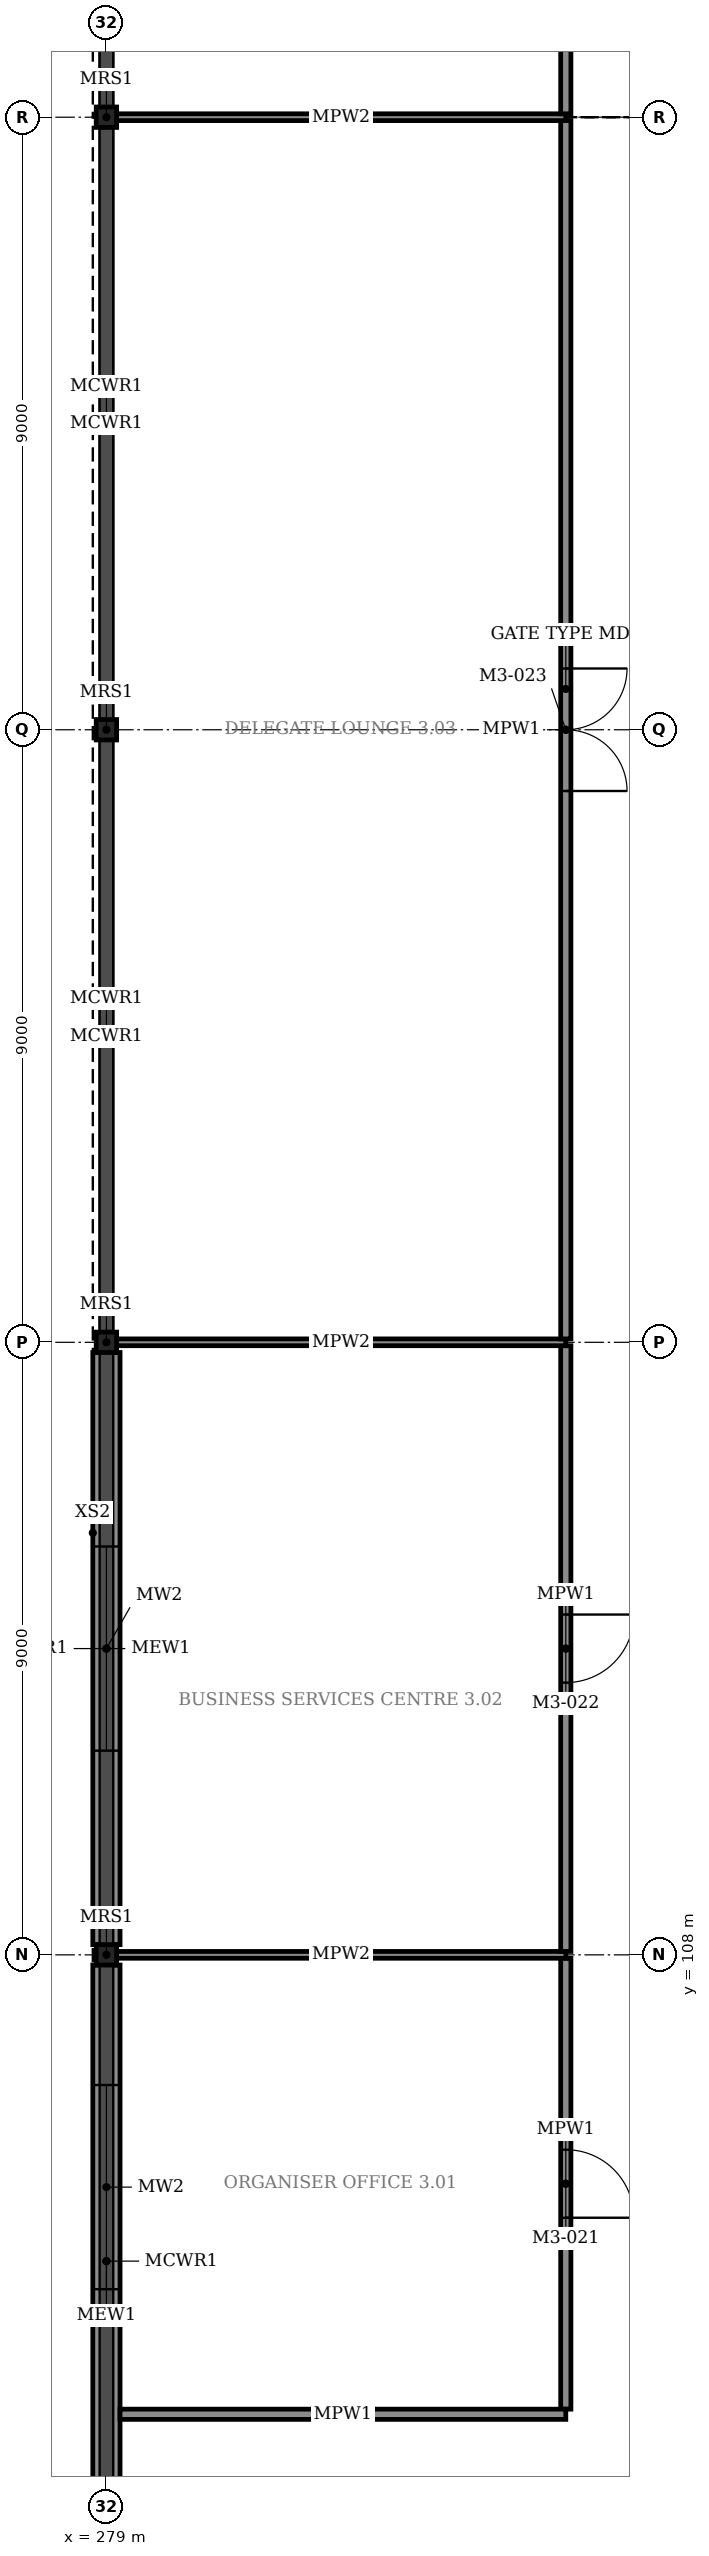
"""IFC4 building model, lengths in metres.
Left out: names, types, materials, properties, quantities, classifications, styles, units other than length and angle.
Written with IfcOpenShell. Run it as: python <this file> out.ifc"""

import sys

from ifc_helpers import new_model, si_unit, direction, frame, frame_2d, origin, origin_2d, place, context, subcontext, project, spatial, rectangle, hollow_rectangle, extrude, element, fill, save


model = new_model("IFC4")
c1 = context("Model", 3, precision=1e-05, world=origin(), true_north=direction((0.0, 1.0)))
c2 = subcontext(c1, "Body", "Model", "MODEL_VIEW")
j1 = project(units=[si_unit("LENGTHUNIT", "METRE"), si_unit("PLANEANGLEUNIT", "RADIAN")], contexts=[c1])
p1 = place(None, origin())
s1 = spatial("IfcSite", under=j1, at=p1, CompositionType="ELEMENT")
p2 = place(p1, origin())
s2 = spatial("IfcBuilding", under=s1, at=p2, CompositionType="ELEMENT")
p3 = place(p2, frame((0.0, 0.0, 17.0)))
s3 = spatial("IfcBuildingStorey", under=s2, at=p3, CompositionType="ELEMENT", Elevation=17.0)
for number, where, z_axis, x_axis in (
    (1, (279.0, 108.0, 0.0), (0.0, 0.0, 1.0), (1.0, 0.0, 0.0)),
    (2, (279.0, 117.0, 0.0), (0.0, 0.0, 1.0), (1.0, 0.0, 0.0)),
    (3, (279.0, 126.0, 0.0), (0.0, 0.0, 1.0), (1.0, 0.0, 0.0)),
    (4, (279.0, 135.0, 0.0), (0.0, 0.0, 1.0), (1.0, 0.0, 0.0)),
):
    element("IfcColumn", number, at=place(p3, frame(where, z_axis=z_axis, x_axis=x_axis)), inside=s3, PredefinedType="COLUMN", context=c2, shape_type="SweptSolid", body=[
        extrude(hollow_rectangle(XDim=0.3, YDim=0.3, WallThickness=0.012, InnerFilletRadius=0.024, OuterFilletRadius=0.036, at=origin_2d()), origin(), (0.0, 0.0, 1.0), 3.1),
    ])
p4 = place(p3, frame((279.0, 99.15, 0.0), z_axis=(0.0, 0.0, 1.0), x_axis=(0.0, 1.0, 0.0)))
e5 = element("IfcWall", 5, at=p4, inside=s3, PredefinedType="STANDARD", context=c2, shape_type="SweptSolid", body=[
    extrude(rectangle(XDim=8.7, YDim=0.4, at=frame_2d((4.35, 0.0))), origin(), (0.0, 0.0, 1.0), 3.3),
])
p5 = place(p4, frame((3.938, 0.0, 0.9)))
e6 = element("IfcOpeningElement", 6, at=p5, cuts=e5, PredefinedType="OPENING", context=c2, shape_type="SweptSolid", body=[
    extrude(rectangle(XDim=3.0, YDim=2.1, at=frame_2d((1.5, 1.05))), frame((0.0, 0.21, 0.0), z_axis=(0.0, -1.0, 0.0), x_axis=(1.0, 0.0, 0.0)), (0.0, 0.0, 1.0), 0.42),
])
p6 = place(p3, frame((279.0, 108.15, 0.0), z_axis=(0.0, 0.0, 1.0), x_axis=(0.0, 1.0, 0.0)))
e7 = element("IfcWall", 7, at=p6, inside=s3, PredefinedType="STANDARD", context=c2, shape_type="SweptSolid", body=[
    extrude(rectangle(XDim=8.7, YDim=0.4, at=frame_2d((4.35, 0.0))), origin(), (0.0, 0.0, 1.0), 3.3),
])
p7 = place(p6, frame((2.85, 0.0, 0.9)))
e8 = element("IfcOpeningElement", 8, at=p7, cuts=e7, PredefinedType="OPENING", context=c2, shape_type="SweptSolid", body=[
    extrude(rectangle(XDim=3.0, YDim=2.1, at=frame_2d((1.5, 1.05))), frame((0.0, 0.21, 0.0), z_axis=(0.0, -1.0, 0.0), x_axis=(1.0, 0.0, 0.0)), (0.0, 0.0, 1.0), 0.42),
])
p8 = place(p3, frame((279.2, 101.25, 0.0), z_axis=(0.0, 0.0, 1.0), x_axis=(1.0, 0.0, 0.0)))
e9 = element("IfcWall", 9, at=p8, inside=s3, PredefinedType="PARTITIONING", context=c2, shape_type="SweptSolid", body=[
    extrude(rectangle(XDim=6.55, YDim=0.15, at=frame_2d((3.275, 0.0))), origin(), (0.0, 0.0, 1.0), 3.0),
])
p9 = place(p3, frame((279.15, 108.0, 0.0), z_axis=(0.0, 0.0, 1.0), x_axis=(1.0, 0.0, 0.0)))
e10 = element("IfcWall", 10, at=p9, inside=s3, PredefinedType="PARTITIONING", context=c2, shape_type="SweptSolid", body=[
    extrude(rectangle(XDim=6.6, YDim=0.1, at=frame_2d((3.3, 0.0))), origin(), (0.0, 0.0, 1.0), 3.0),
])
p10 = place(p3, frame((285.75, 101.325, 0.0), z_axis=(0.0, 0.0, 1.0), x_axis=(0.0, 1.0, 0.0)))
e11 = element("IfcWall", 11, at=p10, inside=s3, PredefinedType="PARTITIONING", context=c2, shape_type="SweptSolid", body=[
    extrude(rectangle(XDim=6.625, YDim=0.15, at=frame_2d((3.312, 0.0))), origin(), (0.0, 0.0, 1.0), 3.0),
])
p11 = place(p10, frame((2.812, 0.0, 0.0)))
e12 = element("IfcOpeningElement", 12, at=p11, cuts=e11, PredefinedType="OPENING", context=c2, shape_type="SweptSolid", body=[
    extrude(rectangle(XDim=1.0, YDim=2.4, at=frame_2d((0.5, 1.2))), frame((0.0, 0.085, 0.0), z_axis=(0.0, -1.0, 0.0), x_axis=(1.0, 0.0, 0.0)), (0.0, 0.0, 1.0), 0.17),
])
p12 = place(p3, frame((279.15, 117.0, 0.0), z_axis=(0.0, 0.0, 1.0), x_axis=(1.0, 0.0, 0.0)))
e13 = element("IfcWall", 13, at=p12, inside=s3, PredefinedType="PARTITIONING", context=c2, shape_type="SweptSolid", body=[
    extrude(rectangle(XDim=6.6, YDim=0.1, at=frame_2d((3.3, 0.0))), origin(), (0.0, 0.0, 1.0), 3.0),
])
p13 = place(p3, frame((285.75, 108.05, 0.0), z_axis=(0.0, 0.0, 1.0), x_axis=(0.0, 1.0, 0.0)))
e14 = element("IfcWall", 14, at=p13, inside=s3, PredefinedType="PARTITIONING", context=c2, shape_type="SweptSolid", body=[
    extrude(rectangle(XDim=8.9, YDim=0.15, at=frame_2d((4.45, 0.0))), origin(), (0.0, 0.0, 1.0), 3.0),
])
p14 = place(p13, frame((3.95, 0.0, 0.0)))
e15 = element("IfcOpeningElement", 15, at=p14, cuts=e14, PredefinedType="OPENING", context=c2, shape_type="SweptSolid", body=[
    extrude(rectangle(XDim=1.0, YDim=2.4, at=frame_2d((0.5, 1.2))), frame((0.0, 0.085, 0.0), z_axis=(0.0, -1.0, 0.0), x_axis=(1.0, 0.0, 0.0)), (0.0, 0.0, 1.0), 0.17),
])
p15 = place(p3, frame((279.15, 135.0, 0.0), z_axis=(0.0, 0.0, 1.0), x_axis=(1.0, 0.0, 0.0)))
e16 = element("IfcWall", 16, at=p15, inside=s3, PredefinedType="PARTITIONING", context=c2, shape_type="SweptSolid", body=[
    extrude(rectangle(XDim=6.6, YDim=0.1, at=frame_2d((3.3, 0.0))), origin(), (0.0, 0.0, 1.0), 3.0),
])
p16 = place(p3, frame((285.75, 117.05, 0.0), z_axis=(0.0, 0.0, 1.0), x_axis=(0.0, 1.0, 0.0)))
e17 = element("IfcWall", 17, at=p16, inside=s3, PredefinedType="PARTITIONING", context=c2, shape_type="SweptSolid", body=[
    extrude(rectangle(XDim=17.9, YDim=0.15, at=frame_2d((8.95, 0.0))), origin(), (0.0, 0.0, 1.0), 3.0),
])
p17 = place(p16, frame((8.05, 0.0, 0.0)))
e18 = element("IfcOpeningElement", 18, at=p17, cuts=e17, PredefinedType="OPENING", context=c2, shape_type="SweptSolid", body=[
    extrude(rectangle(XDim=1.8, YDim=2.4, at=frame_2d((0.9, 1.2))), frame((0.0, 0.085, 0.0), z_axis=(0.0, -1.0, 0.0), x_axis=(1.0, 0.0, 0.0)), (0.0, 0.0, 1.0), 0.17),
])
p18 = place(p3, frame((285.75, 135.05, 0.0), z_axis=(0.0, 0.0, 1.0), x_axis=(0.0, 1.0, 0.0)))
e19 = element("IfcWall", 19, at=p18, inside=s3, PredefinedType="PARTITIONING", context=c2, shape_type="SweptSolid", body=[
    extrude(rectangle(XDim=8.9, YDim=0.15, at=frame_2d((4.45, 0.0))), origin(), (0.0, 0.0, 1.0), 3.0),
])
p19 = place(p18, frame((3.95, 0.0, 0.0)))
e20 = element("IfcOpeningElement", 20, at=p19, cuts=e19, PredefinedType="OPENING", context=c2, shape_type="SweptSolid", body=[
    extrude(rectangle(XDim=1.0, YDim=2.4, at=frame_2d((0.5, 1.2))), frame((0.0, 0.085, 0.0), z_axis=(0.0, -1.0, 0.0), x_axis=(1.0, 0.0, 0.0)), (0.0, 0.0, 1.0), 0.17),
])
p20 = place(p5, origin())
e21 = element("IfcWindow", 21, at=p20, inside=s3, PartitioningType="TRIPLE_PANEL_VERTICAL", PredefinedType="WINDOW", context=c2, shape_type="SweptSolid", body=[
    extrude(rectangle(XDim=3.0, YDim=2.1, at=frame_2d((1.5, 1.05))), frame((0.0, 0.03, 0.0), z_axis=(0.0, -1.0, 0.0), x_axis=(1.0, 0.0, 0.0)), (0.0, 0.0, 1.0), 0.06),
])
fill(e6, e21)
p21 = place(p7, origin())
e22 = element("IfcWindow", 22, at=p21, inside=s3, PartitioningType="TRIPLE_PANEL_VERTICAL", PredefinedType="WINDOW", context=c2, shape_type="SweptSolid", body=[
    extrude(rectangle(XDim=3.0, YDim=2.1, at=frame_2d((1.5, 1.05))), frame((0.0, 0.03, 0.0), z_axis=(0.0, -1.0, 0.0), x_axis=(1.0, 0.0, 0.0)), (0.0, 0.0, 1.0), 0.06),
])
fill(e8, e22)
p22 = place(p11, frame((1.0, 0.0, 0.0), z_axis=(0.0, 0.0, 1.0), x_axis=(-1.0, 0.0, 0.0)))
e23 = element("IfcDoor", 23, at=p22, inside=s3, OperationType="SINGLE_SWING_LEFT", PredefinedType="DOOR", context=c2, shape_type="SweptSolid", body=[
    extrude(rectangle(XDim=1.0, YDim=2.4, at=frame_2d((0.5, 1.2))), frame((0.0, 0.025, 0.0), z_axis=(0.0, -1.0, 0.0), x_axis=(1.0, 0.0, 0.0)), (0.0, 0.0, 1.0), 0.05),
])
fill(e12, e23)
p23 = place(p14, frame((1.0, 0.0, 0.0), z_axis=(0.0, 0.0, 1.0), x_axis=(-1.0, 0.0, 0.0)))
e24 = element("IfcDoor", 24, at=p23, inside=s3, OperationType="SINGLE_SWING_RIGHT", PredefinedType="DOOR", context=c2, shape_type="SweptSolid", body=[
    extrude(rectangle(XDim=1.0, YDim=2.4, at=frame_2d((0.5, 1.2))), frame((0.0, 0.025, 0.0), z_axis=(0.0, -1.0, 0.0), x_axis=(1.0, 0.0, 0.0)), (0.0, 0.0, 1.0), 0.05),
])
fill(e15, e24)
p24 = place(p17, frame((1.8, 0.0, 0.0), z_axis=(0.0, 0.0, 1.0), x_axis=(-1.0, 0.0, 0.0)))
e25 = element("IfcDoor", 25, at=p24, inside=s3, OperationType="DOUBLE_DOOR_SINGLE_SWING", PredefinedType="DOOR", context=c2, shape_type="SweptSolid", body=[
    extrude(rectangle(XDim=1.8, YDim=2.4, at=frame_2d((0.9, 1.2))), frame((0.0, 0.025, 0.0), z_axis=(0.0, -1.0, 0.0), x_axis=(1.0, 0.0, 0.0)), (0.0, 0.0, 1.0), 0.05),
])
fill(e18, e25)
save(model, sys.argv[1])
